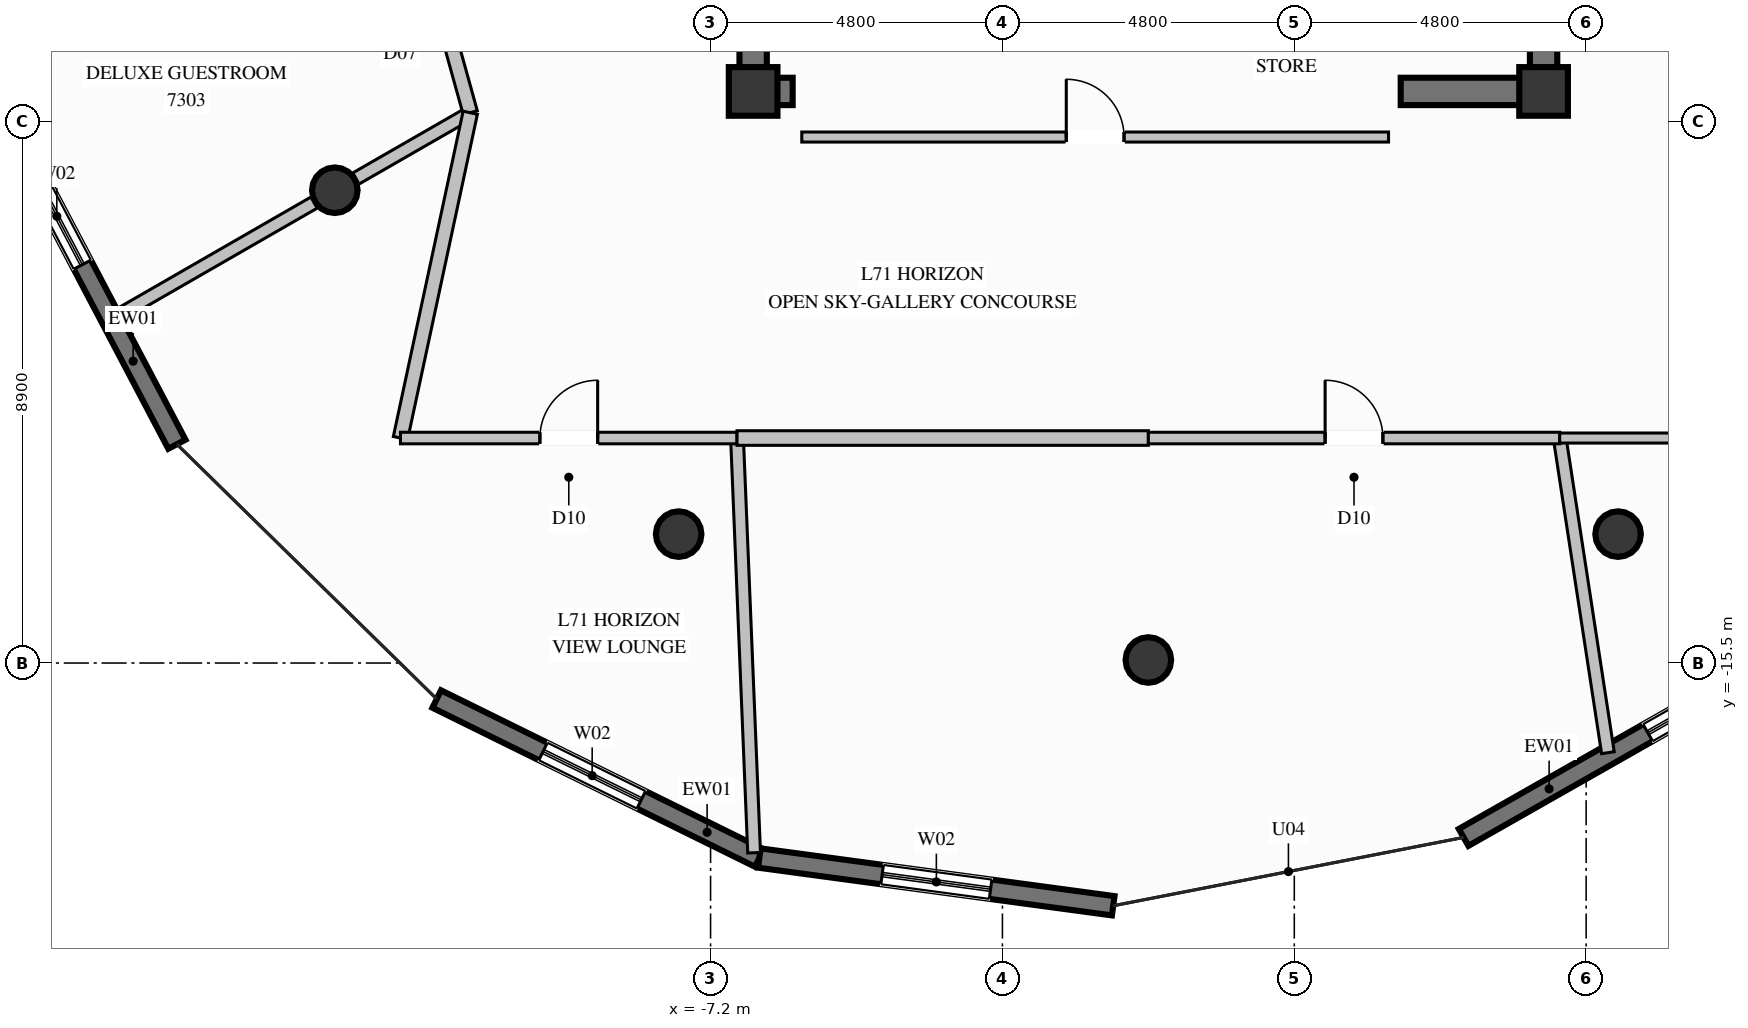
"""IFC4 building model, lengths in metres.
Left out: names, types, materials, properties, quantities, classifications, styles, units other than length and angle.
Written with IfcOpenShell. Run it as: python <this file> out.ifc"""

import sys

from ifc_helpers import new_model, si_unit, direction, frame, frame_2d, origin, origin_2d, place, context, subcontext, project, spatial, rectangle, circle, extrude, element, fill, save


model = new_model("IFC4")
c1 = context("Model", 3, precision=1e-05, world=origin(), true_north=direction((0.0, 1.0)))
c2 = subcontext(c1, "Body", "Model", "MODEL_VIEW")
j1 = project(units=[si_unit("LENGTHUNIT", "METRE"), si_unit("PLANEANGLEUNIT", "RADIAN")], contexts=[c1])
p1 = place(None, origin())
s1 = spatial("IfcSite", under=j1, at=p1, CompositionType="ELEMENT")
p2 = place(p1, origin())
s2 = spatial("IfcBuilding", under=s1, at=p2, CompositionType="ELEMENT")
p3 = place(p2, frame((0.0, 0.0, 274.4)))
s3 = spatial("IfcBuildingStorey", under=s2, at=p3, CompositionType="ELEMENT", Elevation=274.4)
for number, where, z_axis, x_axis in (
    (1, (-6.5, -6.1, 0.0), (0.0, 0.0, 1.0), (1.0, 0.0, 0.0)),
    (2, (6.5, -6.1, 0.0), (0.0, 0.0, 1.0), (1.0, 0.0, 0.0)),
):
    element("IfcColumn", number, at=place(p3, frame(where, z_axis=z_axis, x_axis=x_axis)), inside=s3, PredefinedType="COLUMN", context=c2, shape_type="SweptSolid", body=[
        extrude(rectangle(XDim=0.8, YDim=0.8, at=origin_2d()), origin(), (0.0, 0.0, 1.0), 3.8),
    ])
p4 = place(p3, frame((-6.275, -6.1, 0.0), z_axis=(0.0, 0.0, 1.0), x_axis=(1.0, 0.0, 0.0)))
e3 = element("IfcWall", 3, at=p4, inside=s3, PredefinedType="SHEAR", context=c2, shape_type="SweptSolid", body=[
    extrude(rectangle(XDim=0.425, YDim=0.45, at=frame_2d((0.212, 0.0))), origin(), (0.0, 0.0, 1.0), 3.8),
])
p5 = place(p3, frame((4.15, -6.1, 0.0), z_axis=(0.0, 0.0, 1.0), x_axis=(1.0, 0.0, 0.0)))
e4 = element("IfcWall", 4, at=p5, inside=s3, PredefinedType="SHEAR", context=c2, shape_type="SweptSolid", body=[
    extrude(rectangle(XDim=2.125, YDim=0.45, at=frame_2d((1.062, 0.0))), origin(), (0.0, 0.0, 1.0), 3.8),
])
p6 = place(p3, frame((-6.5, -6.325, 0.0), z_axis=(0.0, 0.0, 1.0), x_axis=(0.0, 1.0, 0.0)))
e5 = element("IfcWall", 5, at=p6, inside=s3, PredefinedType="SHEAR", context=c2, shape_type="SweptSolid", body=[
    extrude(rectangle(XDim=2.975, YDim=0.45, at=frame_2d((1.487, 0.0))), origin(), (0.0, 0.0, 1.0), 3.8),
])
p7 = place(p3, frame((6.5, -6.325, 0.0), z_axis=(0.0, 0.0, 1.0), x_axis=(0.0, 1.0, 0.0)))
e6 = element("IfcWall", 6, at=p7, inside=s3, PredefinedType="SHEAR", context=c2, shape_type="SweptSolid", body=[
    extrude(rectangle(XDim=3.975, YDim=0.45, at=frame_2d((1.987, 0.0))), origin(), (0.0, 0.0, 1.0), 3.8),
])
for number, where, z_axis, x_axis in (
    (7, (-13.38, -7.725, 0.0), (0.0, 0.0, 1.0), (1.0, 0.0, 0.0)),
    (8, (-7.725, -13.38, 0.0), (0.0, 0.0, 1.0), (1.0, 0.0, 0.0)),
    (9, (0.0, -15.45, 0.0), (0.0, 0.0, 1.0), (1.0, 0.0, 0.0)),
    (10, (7.725, -13.38, 0.0), (0.0, 0.0, 1.0), (1.0, 0.0, 0.0)),
):
    element("IfcColumn", number, at=place(p3, frame(where, z_axis=z_axis, x_axis=x_axis)), inside=s3, PredefinedType="COLUMN", context=c2, shape_type="SweptSolid", body=[
        extrude(circle(Radius=0.375, at=origin_2d()), origin(), (0.0, 0.0, 1.0), 3.8),
    ])
p8 = place(p3, frame((10.329, -15.446, 0.0), z_axis=(0.0, 0.0, 1.0), x_axis=(-0.869520200799, -0.493897378413, 0.0)))
e11 = element("IfcWall", 11, at=p8, inside=s3, PredefinedType="SOLIDWALL", context=c2, shape_type="SweptSolid", body=[
    extrude(rectangle(XDim=5.916, YDim=0.32, at=frame_2d((2.958, 0.0))), origin(), (0.0, 0.0, 1.0), 3.57),
])
p9 = place(p8, frame((0.632, 0.0, 0.35)))
e12 = element("IfcOpeningElement", 12, at=p9, cuts=e11, PredefinedType="OPENING", context=c2, shape_type="SweptSolid", body=[
    extrude(rectangle(XDim=1.8, YDim=2.6, at=frame_2d((0.9, 1.3))), frame((0.0, 0.17, 0.0), z_axis=(0.0, -1.0, 0.0), x_axis=(1.0, 0.0, 0.0)), (0.0, 0.0, 1.0), 0.34),
])
p10 = place(p3, frame((-15.977, -11.902, 0.0), z_axis=(0.0, 0.0, 1.0), x_axis=(-0.466004047649, 0.884782587744, 0.0)))
e13 = element("IfcWall", 13, at=p10, inside=s3, PredefinedType="SOLIDWALL", context=c2, shape_type="SweptSolid", body=[
    extrude(rectangle(XDim=6.054, YDim=0.32, at=frame_2d((3.027, 0.0))), origin(), (0.0, 0.0, 1.0), 3.57),
])
p11 = place(p10, frame((3.338, 0.0, 0.35)))
e14 = element("IfcOpeningElement", 14, at=p11, cuts=e13, PredefinedType="OPENING", context=c2, shape_type="SweptSolid", body=[
    extrude(rectangle(XDim=1.8, YDim=2.6, at=frame_2d((0.9, 1.3))), frame((0.0, 0.17, 0.0), z_axis=(0.0, -1.0, 0.0), x_axis=(1.0, 0.0, 0.0)), (0.0, 0.0, 1.0), 0.34),
])
p12 = place(p3, frame((-6.398, -18.707, 0.0), z_axis=(0.0, 0.0, 1.0), x_axis=(-0.896987681867, 0.442055537889, 0.0)))
e15 = element("IfcWall", 15, at=p12, inside=s3, PredefinedType="SOLIDWALL", context=c2, shape_type="SweptSolid", body=[
    extrude(rectangle(XDim=5.916, YDim=0.32, at=frame_2d((2.958, 0.0))), origin(), (0.0, 0.0, 1.0), 3.57),
])
p13 = place(p12, frame((2.165, 0.0, 0.35)))
e16 = element("IfcOpeningElement", 16, at=p13, cuts=e15, PredefinedType="OPENING", context=c2, shape_type="SweptSolid", body=[
    extrude(rectangle(XDim=1.8, YDim=2.6, at=frame_2d((0.9, 1.3))), frame((0.0, 0.17, 0.0), z_axis=(0.0, -1.0, 0.0), x_axis=(1.0, 0.0, 0.0)), (0.0, 0.0, 1.0), 0.34),
])
p14 = place(p3, frame((-0.578, -19.492, 0.0), z_axis=(0.0, 0.0, 1.0), x_axis=(-0.991028181298, 0.133653072817, 0.0)))
e17 = element("IfcWall", 17, at=p14, inside=s3, PredefinedType="SOLIDWALL", context=c2, shape_type="SweptSolid", body=[
    extrude(rectangle(XDim=5.873, YDim=0.32, at=frame_2d((2.937, 0.0))), origin(), (0.0, 0.0, 1.0), 3.57),
])
p15 = place(p14, frame((2.035, 0.0, 0.35)))
e18 = element("IfcOpeningElement", 18, at=p15, cuts=e17, PredefinedType="OPENING", context=c2, shape_type="SweptSolid", body=[
    extrude(rectangle(XDim=1.8, YDim=2.6, at=frame_2d((0.9, 1.3))), frame((0.0, 0.17, 0.0), z_axis=(0.0, -1.0, 0.0), x_axis=(1.0, 0.0, 0.0)), (0.0, 0.0, 1.0), 0.34),
])
p16 = place(p3, frame((-5.7, -6.85, 0.0), z_axis=(0.0, 0.0, 1.0), x_axis=(1.0, 0.0, 0.0)))
e19 = element("IfcWall", 19, at=p16, inside=s3, PredefinedType="PARTITIONING", context=c2, shape_type="SweptSolid", body=[
    extrude(rectangle(XDim=9.65, YDim=0.165, at=frame_2d((4.825, 0.0))), origin(), (0.0, 0.0, 1.0), 2.655),
])
p17 = place(p16, frame((4.35, 0.0, 0.0)))
e20 = element("IfcOpeningElement", 20, at=p17, cuts=e19, PredefinedType="OPENING", context=c2, shape_type="SweptSolid", body=[
    extrude(rectangle(XDim=0.95, YDim=2.1, at=frame_2d((0.475, 1.05))), frame((0.0, 0.093, 0.0), z_axis=(0.0, -1.0, 0.0), x_axis=(1.0, 0.0, 0.0)), (0.0, 0.0, 1.0), 0.185),
])
p18 = place(p3, frame((-11.152, -6.45, 0.0), z_axis=(0.0, 0.0, 1.0), x_axis=(-0.866828578686, -0.498606272698, 0.0)))
e21 = element("IfcWall", 21, at=p18, inside=s3, PredefinedType="PARTITIONING", context=c2, shape_type="SweptSolid", body=[
    extrude(rectangle(XDim=2.172, YDim=0.21, at=frame_2d((1.086, 0.0))), origin(), (0.0, 0.0, 1.0), 3.086),
])
p19 = place(p3, frame((-13.719, -7.927, 0.0), z_axis=(0.0, 0.0, 1.0), x_axis=(-0.866706339444, -0.498818725759, 0.0)))
e22 = element("IfcWall", 22, at=p19, inside=s3, PredefinedType="PARTITIONING", context=c2, shape_type="SweptSolid", body=[
    extrude(rectangle(XDim=3.813, YDim=0.21, at=frame_2d((1.907, 0.0))), origin(), (0.0, 0.0, 1.0), 3.57),
])
p20 = place(p3, frame((-12.166, -2.796, 0.0), z_axis=(0.0, 0.0, 1.0), x_axis=(0.267374891444, -0.963592583733, 0.0)))
e23 = element("IfcWall", 23, at=p20, inside=s3, PredefinedType="PARTITIONING", context=c2, shape_type="SweptSolid", body=[
    extrude(rectangle(XDim=3.792, YDim=0.24, at=frame_2d((1.896, 0.0))), origin(), (0.0, 0.0, 1.0), 3.57),
])
p21 = place(p20, frame((1.396, 0.0, 0.0)))
e24 = element("IfcOpeningElement", 24, at=p21, cuts=e23, PredefinedType="OPENING", context=c2, shape_type="SweptSolid", body=[
    extrude(rectangle(XDim=1.0, YDim=2.2, at=frame_2d((0.5, 1.1))), frame((0.0, 0.13, 0.0), z_axis=(0.0, -1.0, 0.0), x_axis=(1.0, 0.0, 0.0)), (0.0, 0.0, 1.0), 0.26),
])
p22 = place(p3, frame((-6.765, -11.8, 0.0), z_axis=(0.0, 0.0, 1.0), x_axis=(0.041167862291, -0.999152244212, 0.0)))
e25 = element("IfcWall", 25, at=p22, inside=s3, PredefinedType="PARTITIONING", context=c2, shape_type="SweptSolid", body=[
    extrude(rectangle(XDim=6.826, YDim=0.21, at=frame_2d((3.413, 0.0))), origin(), (0.0, 0.0, 1.0), 3.57),
])
p23 = place(p3, frame((-11.152, -6.45, 0.0), z_axis=(0.0, 0.0, 1.0), x_axis=(-0.209791126954, -0.977746226304, 0.0)))
e26 = element("IfcWall", 26, at=p23, inside=s3, PredefinedType="PARTITIONING", context=c2, shape_type="SweptSolid", body=[
    extrude(rectangle(XDim=5.472, YDim=0.24, at=frame_2d((2.736, 0.0))), origin(), (0.0, 0.0, 1.0), 3.57),
])
p24 = place(p3, frame((-12.3, -11.8, 0.0), z_axis=(0.0, 0.0, 1.0), x_axis=(1.0, 0.0, 0.0)))
e27 = element("IfcWall", 27, at=p24, inside=s3, PredefinedType="PARTITIONING", context=c2, shape_type="SweptSolid", body=[
    extrude(rectangle(XDim=5.535, YDim=0.19, at=frame_2d((2.768, 0.0))), origin(), (0.0, 0.0, 1.0), 3.57),
])
p25 = place(p24, frame((2.293, 0.0, 0.0)))
e28 = element("IfcOpeningElement", 28, at=p25, cuts=e27, PredefinedType="OPENING", context=c2, shape_type="SweptSolid", body=[
    extrude(rectangle(XDim=0.95, YDim=2.1, at=frame_2d((0.475, 1.05))), frame((0.0, 0.105, 0.0), z_axis=(0.0, -1.0, 0.0), x_axis=(1.0, 0.0, 0.0)), (0.0, 0.0, 1.0), 0.21),
])
p26 = place(p3, frame((6.765, -11.8, 0.0), z_axis=(0.0, 0.0, 1.0), x_axis=(0.15150701221, -0.988456182767, 0.0)))
e29 = element("IfcWall", 29, at=p26, inside=s3, PredefinedType="PARTITIONING", context=c2, shape_type="SweptSolid", body=[
    extrude(rectangle(XDim=5.236, YDim=0.21, at=frame_2d((2.618, 0.0))), origin(), (0.0, 0.0, 1.0), 3.57),
])
p27 = place(p3, frame((-6.765, -11.8, 0.0), z_axis=(0.0, 0.0, 1.0), x_axis=(1.0, 0.0, 0.0)))
e30 = element("IfcWall", 30, at=p27, inside=s3, PredefinedType="PARTITIONING", context=c2, shape_type="SweptSolid", body=[
    extrude(rectangle(XDim=6.765, YDim=0.24, at=frame_2d((3.382, 0.0))), origin(), (0.0, 0.0, 1.0), 3.57),
])
p28 = place(p3, frame((0.0, -11.8, 0.0), z_axis=(0.0, 0.0, 1.0), x_axis=(1.0, 0.0, 0.0)))
e31 = element("IfcWall", 31, at=p28, inside=s3, PredefinedType="PARTITIONING", context=c2, shape_type="SweptSolid", body=[
    extrude(rectangle(XDim=6.765, YDim=0.19, at=frame_2d((3.382, 0.0))), origin(), (0.0, 0.0, 1.0), 3.57),
])
p29 = place(p28, frame((2.907, 0.0, 0.0)))
e32 = element("IfcOpeningElement", 32, at=p29, cuts=e31, PredefinedType="OPENING", context=c2, shape_type="SweptSolid", body=[
    extrude(rectangle(XDim=0.95, YDim=2.1, at=frame_2d((0.475, 1.05))), frame((0.0, 0.105, 0.0), z_axis=(0.0, -1.0, 0.0), x_axis=(1.0, 0.0, 0.0)), (0.0, 0.0, 1.0), 0.21),
])
p30 = place(p3, frame((6.765, -11.8, 0.0), z_axis=(0.0, 0.0, 1.0), x_axis=(1.0, 0.0, 0.0)))
e33 = element("IfcWall", 33, at=p30, inside=s3, PredefinedType="PARTITIONING", context=c2, shape_type="SweptSolid", body=[
    extrude(rectangle(XDim=5.535, YDim=0.165, at=frame_2d((2.768, 0.0))), origin(), (0.0, 0.0, 1.0), 3.57),
])
p31 = place(p30, frame((2.293, 0.0, 0.0)))
e34 = element("IfcOpeningElement", 34, at=p31, cuts=e33, PredefinedType="OPENING", context=c2, shape_type="SweptSolid", body=[
    extrude(rectangle(XDim=0.95, YDim=2.1, at=frame_2d((0.475, 1.05))), frame((0.0, 0.093, 0.0), z_axis=(0.0, -1.0, 0.0), x_axis=(1.0, 0.0, 0.0)), (0.0, 0.0, 1.0), 0.185),
])
p32 = place(p9, origin())
e35 = element("IfcWindow", 35, at=p32, inside=s3, PartitioningType="SINGLE_PANEL", PredefinedType="WINDOW", context=c2, shape_type="SweptSolid", body=[
    extrude(rectangle(XDim=1.8, YDim=2.6, at=frame_2d((0.9, 1.3))), frame((0.0, 0.03, 0.0), z_axis=(0.0, -1.0, 0.0), x_axis=(1.0, 0.0, 0.0)), (0.0, 0.0, 1.0), 0.06),
])
fill(e12, e35)
p33 = place(p11, origin())
e36 = element("IfcWindow", 36, at=p33, inside=s3, PartitioningType="SINGLE_PANEL", PredefinedType="WINDOW", context=c2, shape_type="SweptSolid", body=[
    extrude(rectangle(XDim=1.8, YDim=2.6, at=frame_2d((0.9, 1.3))), frame((0.0, 0.03, 0.0), z_axis=(0.0, -1.0, 0.0), x_axis=(1.0, 0.0, 0.0)), (0.0, 0.0, 1.0), 0.06),
])
fill(e14, e36)
p34 = place(p13, origin())
e37 = element("IfcWindow", 37, at=p34, inside=s3, PartitioningType="SINGLE_PANEL", PredefinedType="WINDOW", context=c2, shape_type="SweptSolid", body=[
    extrude(rectangle(XDim=1.8, YDim=2.6, at=frame_2d((0.9, 1.3))), frame((0.0, 0.03, 0.0), z_axis=(0.0, -1.0, 0.0), x_axis=(1.0, 0.0, 0.0)), (0.0, 0.0, 1.0), 0.06),
])
fill(e16, e37)
p35 = place(p15, origin())
e38 = element("IfcWindow", 38, at=p35, inside=s3, PartitioningType="SINGLE_PANEL", PredefinedType="WINDOW", context=c2, shape_type="SweptSolid", body=[
    extrude(rectangle(XDim=1.8, YDim=2.6, at=frame_2d((0.9, 1.3))), frame((0.0, 0.03, 0.0), z_axis=(0.0, -1.0, 0.0), x_axis=(1.0, 0.0, 0.0)), (0.0, 0.0, 1.0), 0.06),
])
fill(e18, e38)
p36 = place(p17, origin())
e39 = element("IfcDoor", 39, at=p36, inside=s3, OperationType="SINGLE_SWING_LEFT", PredefinedType="DOOR", context=c2, shape_type="SweptSolid", body=[
    extrude(rectangle(XDim=0.95, YDim=2.1, at=frame_2d((0.475, 1.05))), frame((0.0, 0.025, 0.0), z_axis=(0.0, -1.0, 0.0), x_axis=(1.0, 0.0, 0.0)), (0.0, 0.0, 1.0), 0.05),
])
fill(e20, e39)
p37 = place(p25, origin())
e40 = element("IfcDoor", 40, at=p37, inside=s3, OperationType="SINGLE_SWING_RIGHT", PredefinedType="DOOR", context=c2, shape_type="SweptSolid", body=[
    extrude(rectangle(XDim=0.95, YDim=2.1, at=frame_2d((0.475, 1.05))), frame((0.0, 0.025, 0.0), z_axis=(0.0, -1.0, 0.0), x_axis=(1.0, 0.0, 0.0)), (0.0, 0.0, 1.0), 0.05),
])
fill(e28, e40)
p38 = place(p29, origin())
e41 = element("IfcDoor", 41, at=p38, inside=s3, OperationType="SINGLE_SWING_LEFT", PredefinedType="DOOR", context=c2, shape_type="SweptSolid", body=[
    extrude(rectangle(XDim=0.95, YDim=2.1, at=frame_2d((0.475, 1.05))), frame((0.0, 0.025, 0.0), z_axis=(0.0, -1.0, 0.0), x_axis=(1.0, 0.0, 0.0)), (0.0, 0.0, 1.0), 0.05),
])
fill(e32, e41)
save(model, sys.argv[1])
